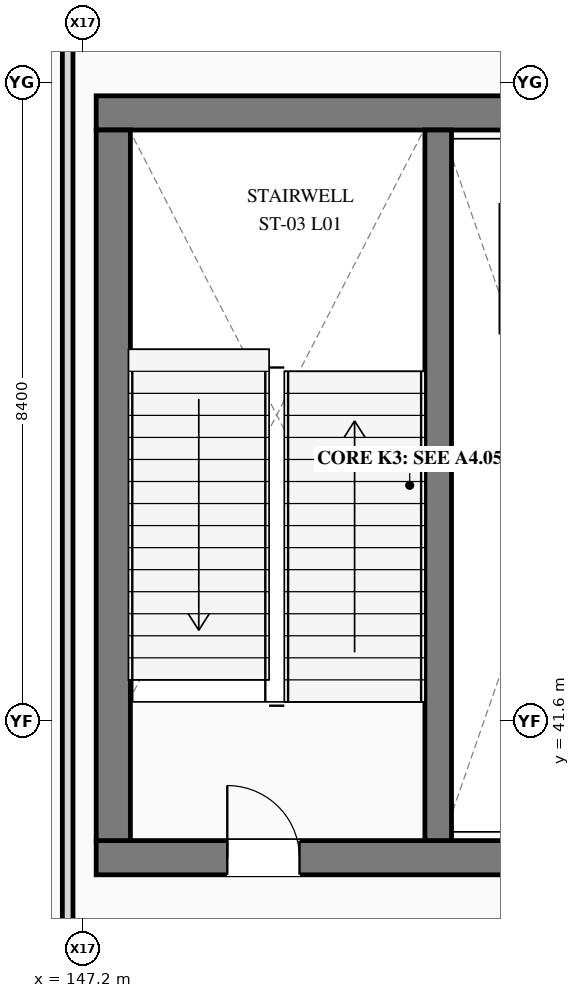
"""IFC4 building model, lengths in metres.
Left out: names, types, materials, properties, quantities, classifications, styles, units other than length and angle.
Written with IfcOpenShell. Run it as: python <this file> out.ifc"""

import sys

from ifc_helpers import new_model, si_unit, direction, frame, frame_2d, origin, place, context, subcontext, project, spatial, rectangle, extrude, element, fill, save


model = new_model("IFC4")
c1 = context("Model", 3, precision=1e-05, world=origin(), true_north=direction((0.0, 1.0)))
c2 = subcontext(c1, "Body", "Model", "MODEL_VIEW")
j1 = project(units=[si_unit("LENGTHUNIT", "METRE"), si_unit("PLANEANGLEUNIT", "RADIAN")], contexts=[c1])
p1 = place(None, origin())
s1 = spatial("IfcSite", under=j1, at=p1, CompositionType="ELEMENT")
p2 = place(p1, origin())
s2 = spatial("IfcBuilding", under=s1, at=p2, CompositionType="ELEMENT")
p3 = place(p2, frame((0.0, 0.0, 5.4)))
s3 = spatial("IfcBuildingStorey", under=s2, at=p3, CompositionType="ELEMENT", Elevation=5.4)
p4 = place(p3, frame((147.375, 39.8, 0.0), z_axis=(0.0, 0.0, 1.0), x_axis=(1.0, 0.0, 0.0)))
e1 = element("IfcWall", 1, at=p4, inside=s3, PredefinedType="SHEAR", context=c2, shape_type="SweptSolid", body=[
    extrude(rectangle(XDim=8.25, YDim=0.45, at=frame_2d((4.125, 0.0))), origin(), (0.0, 0.0, 1.0), 5.4),
])
p5 = place(p4, frame((1.725, 0.0, 0.0)))
e2 = element("IfcOpeningElement", 2, at=p5, cuts=e1, PredefinedType="OPENING", context=c2, shape_type="SweptSolid", body=[
    extrude(rectangle(XDim=0.95, YDim=2.2, at=frame_2d((0.475, 1.1))), frame((0.0, 0.235, 0.0), z_axis=(0.0, -1.0, 0.0), x_axis=(1.0, 0.0, 0.0)), (0.0, 0.0, 1.0), 0.47),
])
p6 = place(p3, frame((155.625, 49.6, 0.0), z_axis=(0.0, 0.0, 1.0), x_axis=(-1.0, 0.0, 0.0)))
e3 = element("IfcWall", 3, at=p6, inside=s3, PredefinedType="SHEAR", context=c2, shape_type="SweptSolid", body=[
    extrude(rectangle(XDim=8.25, YDim=0.45, at=frame_2d((4.125, 0.0))), origin(), (0.0, 0.0, 1.0), 5.4),
])
p7 = place(p3, frame((147.6, 49.375, 0.0), z_axis=(0.0, 0.0, 1.0), x_axis=(0.0, -1.0, 0.0)))
e4 = element("IfcWall", 4, at=p7, inside=s3, PredefinedType="SHEAR", context=c2, shape_type="SweptSolid", body=[
    extrude(rectangle(XDim=9.35, YDim=0.45, at=frame_2d((4.675, 0.0))), origin(), (0.0, 0.0, 1.0), 5.4),
])
p8 = place(p3, frame((151.875, 40.025, 0.0), z_axis=(0.0, 0.0, 1.0), x_axis=(0.0, 1.0, 0.0)))
e5 = element("IfcWall", 5, at=p8, inside=s3, PredefinedType="SHEAR", context=c2, shape_type="SweptSolid", body=[
    extrude(rectangle(XDim=9.35, YDim=0.35, at=frame_2d((4.675, 0.0))), origin(), (0.0, 0.0, 1.0), 5.4),
])
p9 = place(p3, frame((147.0, 38.882, 0.0), z_axis=(0.0, 0.0, 1.0), x_axis=(0.0, 1.0, 0.0)))
e6 = element("IfcWall", 6, at=p9, inside=s3, PredefinedType="PARTITIONING", context=c2, shape_type="SweptSolid", body=[
    extrude(rectangle(XDim=13.436, YDim=0.14, at=frame_2d((6.718, 0.0))), origin(), (0.0, 0.0, 1.0), 5.095),
])
p10 = place(p5, origin())
e7 = element("IfcDoor", 7, at=p10, inside=s3, OperationType="SINGLE_SWING_LEFT", PredefinedType="DOOR", context=c2, shape_type="SweptSolid", body=[
    extrude(rectangle(XDim=0.95, YDim=2.2, at=frame_2d((0.475, 1.1))), frame((0.0, 0.025, 0.0), z_axis=(0.0, -1.0, 0.0), x_axis=(1.0, 0.0, 0.0)), (0.0, 0.0, 1.0), 0.05),
])
fill(e2, e7)
save(model, sys.argv[1])
